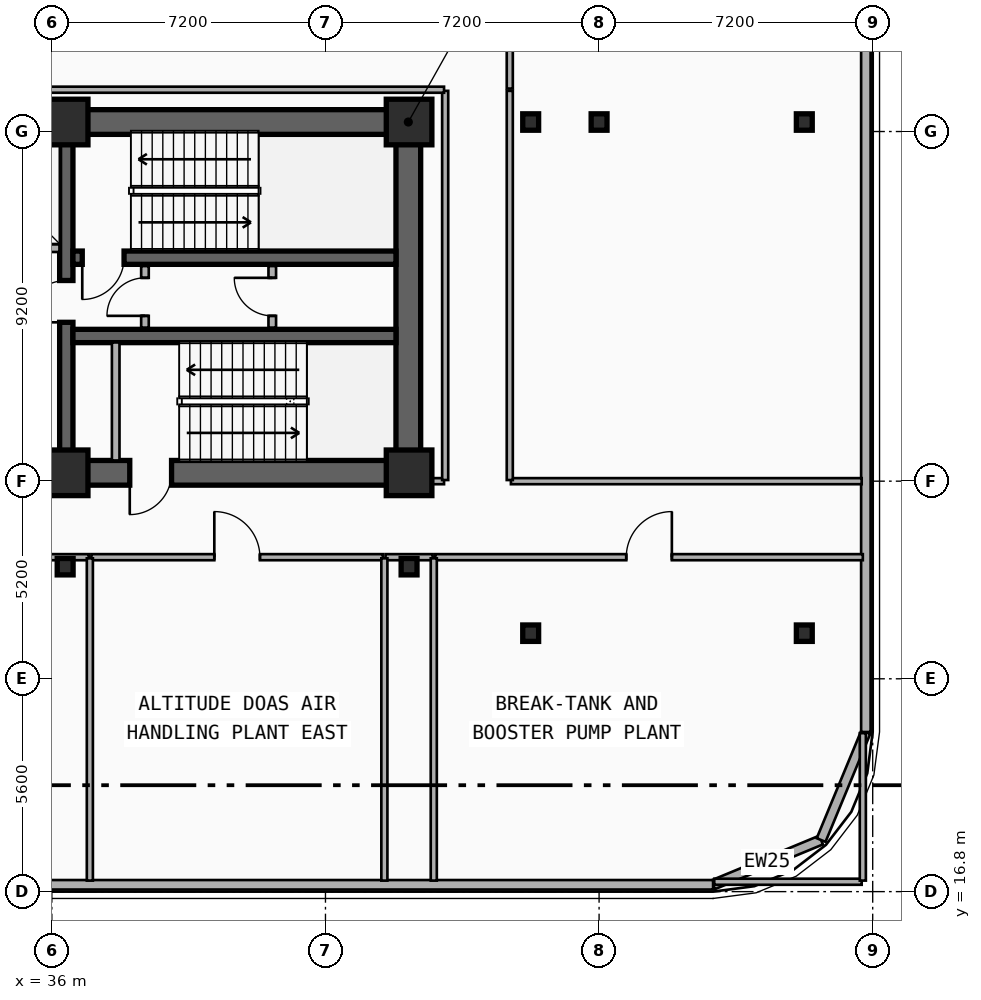
"""IFC4 building model, lengths in metres.
Left out: names, types, materials, properties, quantities, classifications, styles, units other than length and angle.
Written with IfcOpenShell. Run it as: python <this file> out.ifc"""

import sys

from ifc_helpers import new_model, si_unit, direction, frame, frame_2d, origin, origin_2d, place, context, subcontext, project, spatial, rectangle, i_section, extrude, element, fill, save


model = new_model("IFC4")
c1 = context("Model", 3, precision=1e-05, world=origin(), true_north=direction((0.0, 1.0)))
c2 = subcontext(c1, "Body", "Model", "MODEL_VIEW")
j1 = project(units=[si_unit("LENGTHUNIT", "METRE"), si_unit("PLANEANGLEUNIT", "RADIAN")], contexts=[c1])
p1 = place(None, origin())
s1 = spatial("IfcSite", under=j1, at=p1, CompositionType="ELEMENT")
p2 = place(p1, origin())
s2 = spatial("IfcBuilding", under=s1, at=p2, CompositionType="ELEMENT")
p3 = place(p2, frame((0.0, 0.0, 132.9)))
s3 = spatial("IfcBuildingStorey", under=s2, at=p3, CompositionType="ELEMENT", Elevation=132.9)
p4 = place(p3, frame((12.15, 37.05, 0.0), z_axis=(0.0, 0.0, 1.0), x_axis=(1.0, 0.0, 0.0)))
e1 = element("IfcWall", 1, at=p4, inside=s3, PredefinedType="SHEAR", context=c2, shape_type="SweptSolid", body=[
    extrude(rectangle(XDim=33.23, YDim=0.65, at=frame_2d((16.615, 0.0))), origin(), (0.0, 0.0, 1.0), 4.8),
])
p5 = place(p3, frame((45.38, 27.82, 0.0), z_axis=(0.0, 0.0, 1.0), x_axis=(-1.0, 0.0, 0.0)))
e2 = element("IfcWall", 2, at=p5, inside=s3, PredefinedType="SHEAR", context=c2, shape_type="SweptSolid", body=[
    extrude(rectangle(XDim=12.23, YDim=0.65, at=frame_2d((6.115, 0.0))), origin(), (0.0, 0.0, 1.0), 4.8),
])
p6 = place(p5, frame((9.93, 0.0, 0.0)))
e3 = element("IfcOpeningElement", 3, at=p6, cuts=e2, PredefinedType="OPENING", context=c2, shape_type="SweptSolid", body=[
    extrude(rectangle(XDim=1.1, YDim=2.15, at=frame_2d((0.55, 1.075))), frame((0.0, 0.335, 0.0), z_axis=(0.0, -1.0, 0.0), x_axis=(1.0, 0.0, 0.0)), (0.0, 0.0, 1.0), 0.67),
])
p7 = place(p5, frame((6.23, 0.0, 0.0)))
e4 = element("IfcOpeningElement", 4, at=p7, cuts=e2, PredefinedType="OPENING", context=c2, shape_type="SweptSolid", body=[
    extrude(rectangle(XDim=1.1, YDim=2.15, at=frame_2d((0.55, 1.075))), frame((0.0, 0.335, 0.0), z_axis=(0.0, -1.0, 0.0), x_axis=(1.0, 0.0, 0.0)), (0.0, 0.0, 1.0), 0.67),
])
p8 = place(p3, frame((45.38, 28.145, 0.0), z_axis=(0.0, 0.0, 1.0), x_axis=(0.0, 1.0, 0.0)))
e5 = element("IfcWall", 5, at=p8, inside=s3, PredefinedType="SHEAR", context=c2, shape_type="SweptSolid", body=[
    extrude(rectangle(XDim=8.58, YDim=0.65, at=frame_2d((4.29, 0.0))), origin(), (0.0, 0.0, 1.0), 4.8),
])
p9 = place(p3, frame((36.38, 28.145, 0.0), z_axis=(0.0, 0.0, 1.0), x_axis=(0.0, 1.0, 0.0)))
e6 = element("IfcWall", 6, at=p9, inside=s3, PredefinedType="SHEAR", context=c2, shape_type="SweptSolid", body=[
    extrude(rectangle(XDim=8.58, YDim=0.35, at=frame_2d((4.29, 0.0))), origin(), (0.0, 0.0, 1.0), 4.8),
])
p10 = place(p9, frame((3.635, 0.0, 0.0)))
e7 = element("IfcOpeningElement", 7, at=p10, cuts=e6, PredefinedType="OPENING", context=c2, shape_type="SweptSolid", body=[
    extrude(rectangle(XDim=1.1, YDim=2.15, at=frame_2d((0.55, 1.075))), frame((0.0, 0.185, 0.0), z_axis=(0.0, -1.0, 0.0), x_axis=(1.0, 0.0, 0.0)), (0.0, 0.0, 1.0), 0.37),
])
p11 = place(p3, frame((45.055, 33.48, 0.0), z_axis=(0.0, 0.0, 1.0), x_axis=(-1.0, 0.0, 0.0)))
e8 = element("IfcWall", 8, at=p11, inside=s3, PredefinedType="SHEAR", context=c2, shape_type="SweptSolid", body=[
    extrude(rectangle(XDim=8.5, YDim=0.35, at=frame_2d((4.25, 0.0))), origin(), (0.0, 0.0, 1.0), 4.8),
])
p12 = place(p11, frame((7.155, 0.0, 0.0)))
e9 = element("IfcOpeningElement", 9, at=p12, cuts=e8, PredefinedType="OPENING", context=c2, shape_type="SweptSolid", body=[
    extrude(rectangle(XDim=1.1, YDim=2.15, at=frame_2d((0.55, 1.075))), frame((0.0, 0.185, 0.0), z_axis=(0.0, -1.0, 0.0), x_axis=(1.0, 0.0, 0.0)), (0.0, 0.0, 1.0), 0.37),
])
p13 = place(p3, frame((36.555, 31.42, 0.0), z_axis=(0.0, 0.0, 1.0), x_axis=(1.0, 0.0, 0.0)))
e10 = element("IfcWall", 10, at=p13, inside=s3, PredefinedType="SHEAR", context=c2, shape_type="SweptSolid", body=[
    extrude(rectangle(XDim=8.5, YDim=0.35, at=frame_2d((4.25, 0.0))), origin(), (0.0, 0.0, 1.0), 4.8),
])
for number, where, z_axis, x_axis in (
    (11, (36.35, 27.82, 0.0), (0.0, 0.0, 1.0), (1.0, 0.0, 0.0)),
    (12, (36.35, 37.05, 0.0), (0.0, 0.0, 1.0), (1.0, 0.0, 0.0)),
    (13, (45.4, 27.82, 0.0), (0.0, 0.0, 1.0), (1.0, 0.0, 0.0)),
    (14, (45.4, 37.05, 0.0), (0.0, 0.0, 1.0), (1.0, 0.0, 0.0)),
):
    element("IfcColumn", number, at=place(p3, frame(where, z_axis=z_axis, x_axis=x_axis)), inside=s3, PredefinedType="COLUMN", context=c2, shape_type="SweptSolid", body=[
        extrude(rectangle(XDim=1.2, YDim=1.2, at=origin_2d()), origin(), (0.0, 0.0, 1.0), 4.8),
    ])
for number, where, z_axis, x_axis in (
    (15, (36.35, 25.35, 0.0), (0.0, 0.0, 1.0), (1.0, 0.0, 0.0)),
    (16, (45.4, 25.35, 0.0), (0.0, 0.0, 1.0), (1.0, 0.0, 0.0)),
    (17, (48.6, 23.6, 0.0), (0.0, 0.0, 1.0), (1.0, 0.0, 0.0)),
    (18, (48.6, 37.05, 0.0), (0.0, 0.0, 1.0), (1.0, 0.0, 0.0)),
    (19, (50.4, 37.05, 0.0), (0.0, 0.0, 1.0), (1.0, 0.0, 0.0)),
    (20, (55.8, 23.6, 0.0), (0.0, 0.0, 1.0), (1.0, 0.0, 0.0)),
    (21, (55.8, 37.05, 0.0), (0.0, 0.0, 1.0), (1.0, 0.0, 0.0)),
):
    element("IfcColumn", number, at=place(p3, frame(where, z_axis=z_axis, x_axis=x_axis)), inside=s3, PredefinedType="COLUMN", context=c2, shape_type="SweptSolid", body=[
        extrude(i_section(OverallWidth=0.418, OverallDepth=0.432, WebThickness=0.035, FlangeThickness=0.056, FilletRadius=0.015, at=origin_2d()), origin(), (0.0, 0.0, 1.0), 4.8),
    ])
p14 = place(p3, frame((56.243, 18.157, 0.0), z_axis=(0.0, 0.0, 1.0), x_axis=(-0.923882414032, -0.382676475685, 0.0)))
e22 = element("IfcWall", 22, at=p14, inside=s3, PredefinedType="SOLIDWALL", context=c2, shape_type="SweptSolid", body=[
    extrude(rectangle(XDim=3.077, YDim=0.25, at=frame_2d((1.539, 0.0))), origin(), (0.0, 0.0, 1.0), 4.48),
])
p15 = place(p3, frame((57.42, 21.0, 0.0), z_axis=(0.0, 0.0, 1.0), x_axis=(-0.382636798336, -0.92389884758, 0.0)))
e23 = element("IfcWall", 23, at=p15, inside=s3, PredefinedType="SOLIDWALL", context=c2, shape_type="SweptSolid", body=[
    extrude(rectangle(XDim=3.077, YDim=0.25, at=frame_2d((1.538, 0.0))), origin(), (0.0, 0.0, 1.0), 4.48),
])
p16 = place(p3, frame((57.42, 39.0, 0.0), z_axis=(0.0, 0.0, 1.0), x_axis=(0.0, -1.0, 0.0)))
e24 = element("IfcWall", 24, at=p16, inside=s3, PredefinedType="SOLIDWALL", context=c2, shape_type="SweptSolid", body=[
    extrude(rectangle(XDim=18.0, YDim=0.25, at=frame_2d((9.0, 0.0))), origin(), (0.0, 0.0, 1.0), 4.48),
])
p17 = place(p3, frame((53.4, 16.98, 0.0), z_axis=(0.0, 0.0, 1.0), x_axis=(-1.0, 0.0, 0.0)))
e25 = element("IfcWall", 25, at=p17, inside=s3, PredefinedType="SOLIDWALL", context=c2, shape_type="SweptSolid", body=[
    extrude(rectangle(XDim=49.2, YDim=0.25, at=frame_2d((24.6, 0.0))), origin(), (0.0, 0.0, 1.0), 3.92),
])
p18 = place(p3, frame((33.475, 33.73, 0.0), z_axis=(0.0, 0.0, 1.0), x_axis=(1.0, 0.0, 0.0)))
e26 = element("IfcWall", 26, at=p18, inside=s3, PredefinedType="PARTITIONING", context=c2, shape_type="SweptSolid", body=[
    extrude(rectangle(XDim=2.725, YDim=0.2, at=frame_2d((1.362, 0.0))), origin(), (0.0, 0.0, 1.0), 3.452),
])
p19 = place(p18, frame((0.812, 0.0, 0.0)))
e27 = element("IfcOpeningElement", 27, at=p19, cuts=e26, PredefinedType="OPENING", context=c2, shape_type="SweptSolid", body=[
    extrude(rectangle(XDim=1.1, YDim=2.15, at=frame_2d((0.55, 1.075))), frame((0.0, 0.11, 0.0), z_axis=(0.0, -1.0, 0.0), x_axis=(1.0, 0.0, 0.0)), (0.0, 0.0, 1.0), 0.22),
])
p20 = place(p3, frame((37.68, 28.145, 0.0), z_axis=(0.0, 0.0, 1.0), x_axis=(0.0, 1.0, 0.0)))
e28 = element("IfcWall", 28, at=p20, inside=s3, PredefinedType="PARTITIONING", context=c2, shape_type="SweptSolid", body=[
    extrude(rectangle(XDim=3.105, YDim=0.2, at=frame_2d((1.552, 0.0))), origin(), (0.0, 0.0, 1.0), 3.86),
])
p21 = place(p3, frame((38.45, 31.64, 0.0), z_axis=(0.0, 0.0, 1.0), x_axis=(0.0, 1.0, 0.0)))
e29 = element("IfcWall", 29, at=p21, inside=s3, PredefinedType="PARTITIONING", context=c2, shape_type="SweptSolid", body=[
    extrude(rectangle(XDim=1.62, YDim=0.2, at=frame_2d((0.81, 0.0))), origin(), (0.0, 0.0, 1.0), 4.48),
])
p22 = place(p21, frame((0.31, 0.0, 0.0)))
e30 = element("IfcOpeningElement", 30, at=p22, cuts=e29, PredefinedType="OPENING", context=c2, shape_type="SweptSolid", body=[
    extrude(rectangle(XDim=1.0, YDim=2.15, at=frame_2d((0.5, 1.075))), frame((0.0, 0.11, 0.0), z_axis=(0.0, -1.0, 0.0), x_axis=(1.0, 0.0, 0.0)), (0.0, 0.0, 1.0), 0.22),
])
p23 = place(p3, frame((41.8, 31.64, 0.0), z_axis=(0.0, 0.0, 1.0), x_axis=(0.0, 1.0, 0.0)))
e31 = element("IfcWall", 31, at=p23, inside=s3, PredefinedType="PARTITIONING", context=c2, shape_type="SweptSolid", body=[
    extrude(rectangle(XDim=1.62, YDim=0.2, at=frame_2d((0.81, 0.0))), origin(), (0.0, 0.0, 1.0), 4.48),
])
p24 = place(p23, frame((0.31, 0.0, 0.0)))
e32 = element("IfcOpeningElement", 32, at=p24, cuts=e31, PredefinedType="OPENING", context=c2, shape_type="SweptSolid", body=[
    extrude(rectangle(XDim=1.0, YDim=2.15, at=frame_2d((0.5, 1.075))), frame((0.0, 0.11, 0.0), z_axis=(0.0, -1.0, 0.0), x_axis=(1.0, 0.0, 0.0)), (0.0, 0.0, 1.0), 0.22),
])
p25 = place(p3, frame((37.04, 25.6, 0.0), z_axis=(0.0, 0.0, 1.0), x_axis=(1.0, 0.0, 0.0)))
e33 = element("IfcWall", 33, at=p25, inside=s3, PredefinedType="PARTITIONING", context=c2, shape_type="SweptSolid", body=[
    extrude(rectangle(XDim=7.67, YDim=0.16, at=frame_2d((3.835, 0.0))), origin(), (0.0, 0.0, 1.0), 4.48),
])
p26 = place(p25, frame((3.235, 0.0, 0.0)))
e34 = element("IfcOpeningElement", 34, at=p26, cuts=e33, PredefinedType="OPENING", context=c2, shape_type="SweptSolid", body=[
    extrude(rectangle(XDim=1.2, YDim=2.15, at=frame_2d((0.6, 1.075))), frame((0.0, 0.09, 0.0), z_axis=(0.0, -1.0, 0.0), x_axis=(1.0, 0.0, 0.0)), (0.0, 0.0, 1.0), 0.18),
])
p27 = place(p3, frame((46.09, 25.6, 0.0), z_axis=(0.0, 0.0, 1.0), x_axis=(1.0, 0.0, 0.0)))
e35 = element("IfcWall", 35, at=p27, inside=s3, PredefinedType="PARTITIONING", context=c2, shape_type="SweptSolid", body=[
    extrude(rectangle(XDim=11.25, YDim=0.16, at=frame_2d((5.625, 0.0))), origin(), (0.0, 0.0, 1.0), 3.81),
])
p28 = place(p27, frame((5.025, 0.0, 0.0)))
e36 = element("IfcOpeningElement", 36, at=p28, cuts=e35, PredefinedType="OPENING", context=c2, shape_type="SweptSolid", body=[
    extrude(rectangle(XDim=1.2, YDim=2.15, at=frame_2d((0.6, 1.075))), frame((0.0, 0.09, 0.0), z_axis=(0.0, -1.0, 0.0), x_axis=(1.0, 0.0, 0.0)), (0.0, 0.0, 1.0), 0.18),
])
p29 = place(p3, frame((20.68, 25.6, 0.0), z_axis=(0.0, 0.0, 1.0), x_axis=(1.0, 0.0, 0.0)))
e37 = element("IfcWall", 37, at=p29, inside=s3, PredefinedType="PARTITIONING", context=c2, shape_type="SweptSolid", body=[
    extrude(rectangle(XDim=16.29, YDim=0.16, at=frame_2d((8.145, 0.0))), origin(), (0.0, 0.0, 1.0), 3.646),
])
p30 = place(p3, frame((44.78, 25.6, 0.0), z_axis=(0.0, 0.0, 1.0), x_axis=(1.0, 0.0, 0.0)))
e38 = element("IfcWall", 38, at=p30, inside=s3, PredefinedType="PARTITIONING", context=c2, shape_type="SweptSolid", body=[
    extrude(rectangle(XDim=1.24, YDim=0.16, at=frame_2d((0.62, 0.0))), origin(), (0.0, 0.0, 1.0), 3.646),
])
p31 = place(p3, frame((45.41, 27.6, 0.0), z_axis=(0.0, 0.0, 1.0), x_axis=(1.0, 0.0, 0.0)))
e39 = element("IfcWall", 39, at=p31, inside=s3, PredefinedType="PARTITIONING", context=c2, shape_type="SweptSolid", body=[
    extrude(rectangle(XDim=0.91, YDim=0.16, at=frame_2d((0.455, 0.0))), origin(), (0.0, 0.0, 1.0), 3.452),
])
p32 = place(p3, frame((48.08, 27.6, 0.0), z_axis=(0.0, 0.0, 1.0), x_axis=(1.0, 0.0, 0.0)))
e40 = element("IfcWall", 40, at=p32, inside=s3, PredefinedType="PARTITIONING", context=c2, shape_type="SweptSolid", body=[
    extrude(rectangle(XDim=9.23, YDim=0.16, at=frame_2d((4.615, 0.0))), origin(), (0.0, 0.0, 1.0), 3.81),
])
for number, where, z_axis, x_axis in (
    (41, (46.35, 27.63, 0.0), (0.0, 0.0, 1.0), (0.0, 1.0, 0.0)),
    (42, (48.05, 27.63, 0.0), (0.0, 0.0, 1.0), (0.0, 1.0, 0.0)),
):
    element("IfcWall", number, at=place(p3, frame(where, z_axis=z_axis, x_axis=x_axis)), inside=s3, PredefinedType="PARTITIONING", context=c2, shape_type="SweptSolid", body=[
        extrude(rectangle(XDim=10.24, YDim=0.16, at=frame_2d((5.12, 0.0))), origin(), (0.0, 0.0, 1.0), 3.96),
    ])
p33 = place(p3, frame((9.58, 37.9, 0.0), z_axis=(0.0, 0.0, 1.0), x_axis=(1.0, 0.0, 0.0)))
e43 = element("IfcWall", 43, at=p33, inside=s3, PredefinedType="PARTITIONING", context=c2, shape_type="SweptSolid", body=[
    extrude(rectangle(XDim=36.74, YDim=0.16, at=frame_2d((18.37, 0.0))), origin(), (0.0, 0.0, 1.0), 4.48),
])
p34 = place(p3, frame((48.05, 37.93, 0.0), z_axis=(0.0, 0.0, 1.0), x_axis=(0.0, 1.0, 0.0)))
e44 = element("IfcWall", 44, at=p34, inside=s3, PredefinedType="PARTITIONING", context=c2, shape_type="SweptSolid", body=[
    extrude(rectangle(XDim=1.44, YDim=0.16, at=frame_2d((0.72, 0.0))), origin(), (0.0, 0.0, 1.0), 4.48),
])
for number, where, z_axis, x_axis in (
    (45, (37.0, 17.09, 0.0), (0.0, 0.0, 1.0), (0.0, 1.0, 0.0)),
    (46, (44.75, 17.09, 0.0), (0.0, 0.0, 1.0), (0.0, 1.0, 0.0)),
):
    element("IfcWall", number, at=place(p3, frame(where, z_axis=z_axis, x_axis=x_axis)), inside=s3, PredefinedType="PARTITIONING", context=c2, shape_type="SweptSolid", body=[
        extrude(rectangle(XDim=8.48, YDim=0.16, at=frame_2d((4.24, 0.0))), origin(), (0.0, 0.0, 1.0), 3.97),
    ])
p35 = place(p3, frame((53.43, 17.06, 0.0), z_axis=(0.0, 0.0, 1.0), x_axis=(1.0, 0.0, 0.0)))
e47 = element("IfcWall", 47, at=p35, inside=s3, PredefinedType="PARTITIONING", context=c2, shape_type="SweptSolid", body=[
    extrude(rectangle(XDim=3.88, YDim=0.16, at=frame_2d((1.94, 0.0))), origin(), (0.0, 0.0, 1.0), 3.96),
])
p36 = place(p3, frame((46.05, 17.09, 0.0), z_axis=(0.0, 0.0, 1.0), x_axis=(0.0, 1.0, 0.0)))
e48 = element("IfcWall", 48, at=p36, inside=s3, PredefinedType="PARTITIONING", context=c2, shape_type="SweptSolid", body=[
    extrude(rectangle(XDim=8.48, YDim=0.16, at=frame_2d((4.24, 0.0))), origin(), (0.0, 0.0, 1.0), 3.96),
])
p37 = place(p3, frame((57.34, 17.09, 0.0), z_axis=(0.0, 0.0, 1.0), x_axis=(0.0, 1.0, 0.0)))
e49 = element("IfcWall", 49, at=p37, inside=s3, PredefinedType="PARTITIONING", context=c2, shape_type="SweptSolid", body=[
    extrude(rectangle(XDim=3.88, YDim=0.16, at=frame_2d((1.94, 0.0))), origin(), (0.0, 0.0, 1.0), 4.48),
])
p38 = place(p12, origin())
e50 = element("IfcDoor", 50, at=p38, inside=s3, OperationType="SINGLE_SWING_RIGHT", PredefinedType="DOOR", context=c2, shape_type="SweptSolid", body=[
    extrude(rectangle(XDim=1.1, YDim=2.15, at=frame_2d((0.55, 1.075))), frame((0.0, 0.025, 0.0), z_axis=(0.0, -1.0, 0.0), x_axis=(1.0, 0.0, 0.0)), (0.0, 0.0, 1.0), 0.05),
])
fill(e9, e50)
p39 = place(p10, origin())
e51 = element("IfcDoor", 51, at=p39, inside=s3, OperationType="SINGLE_SWING_LEFT", PredefinedType="DOOR", context=c2, shape_type="SweptSolid", body=[
    extrude(rectangle(XDim=1.1, YDim=2.15, at=frame_2d((0.55, 1.075))), frame((0.0, 0.025, 0.0), z_axis=(0.0, -1.0, 0.0), x_axis=(1.0, 0.0, 0.0)), (0.0, 0.0, 1.0), 0.05),
])
fill(e7, e51)
p40 = place(p7, origin())
e52 = element("IfcDoor", 52, at=p40, inside=s3, OperationType="SINGLE_SWING_RIGHT", PredefinedType="DOOR", context=c2, shape_type="SweptSolid", body=[
    extrude(rectangle(XDim=1.1, YDim=2.15, at=frame_2d((0.55, 1.075))), frame((0.0, 0.025, 0.0), z_axis=(0.0, -1.0, 0.0), x_axis=(1.0, 0.0, 0.0)), (0.0, 0.0, 1.0), 0.05),
])
fill(e4, e52)
p41 = place(p22, origin())
e53 = element("IfcDoor", 53, at=p41, inside=s3, OperationType="SINGLE_SWING_LEFT", PredefinedType="DOOR", context=c2, shape_type="SweptSolid", body=[
    extrude(rectangle(XDim=1.0, YDim=2.15, at=frame_2d((0.5, 1.075))), frame((0.0, 0.025, 0.0), z_axis=(0.0, -1.0, 0.0), x_axis=(1.0, 0.0, 0.0)), (0.0, 0.0, 1.0), 0.05),
])
fill(e30, e53)
p42 = place(p24, origin())
e54 = element("IfcDoor", 54, at=p42, inside=s3, OperationType="SINGLE_SWING_RIGHT", PredefinedType="DOOR", context=c2, shape_type="SweptSolid", body=[
    extrude(rectangle(XDim=1.0, YDim=2.15, at=frame_2d((0.5, 1.075))), frame((0.0, 0.025, 0.0), z_axis=(0.0, -1.0, 0.0), x_axis=(1.0, 0.0, 0.0)), (0.0, 0.0, 1.0), 0.05),
])
fill(e32, e54)
p43 = place(p26, origin())
e55 = element("IfcDoor", 55, at=p43, inside=s3, OperationType="SINGLE_SWING_LEFT", PredefinedType="DOOR", context=c2, shape_type="SweptSolid", body=[
    extrude(rectangle(XDim=1.2, YDim=2.15, at=frame_2d((0.6, 1.075))), frame((0.0, 0.025, 0.0), z_axis=(0.0, -1.0, 0.0), x_axis=(1.0, 0.0, 0.0)), (0.0, 0.0, 1.0), 0.05),
])
fill(e34, e55)
p44 = place(p28, origin())
e56 = element("IfcDoor", 56, at=p44, inside=s3, OperationType="SINGLE_SWING_RIGHT", PredefinedType="DOOR", context=c2, shape_type="SweptSolid", body=[
    extrude(rectangle(XDim=1.2, YDim=2.15, at=frame_2d((0.6, 1.075))), frame((0.0, 0.025, 0.0), z_axis=(0.0, -1.0, 0.0), x_axis=(1.0, 0.0, 0.0)), (0.0, 0.0, 1.0), 0.05),
])
fill(e36, e56)
save(model, sys.argv[1])
